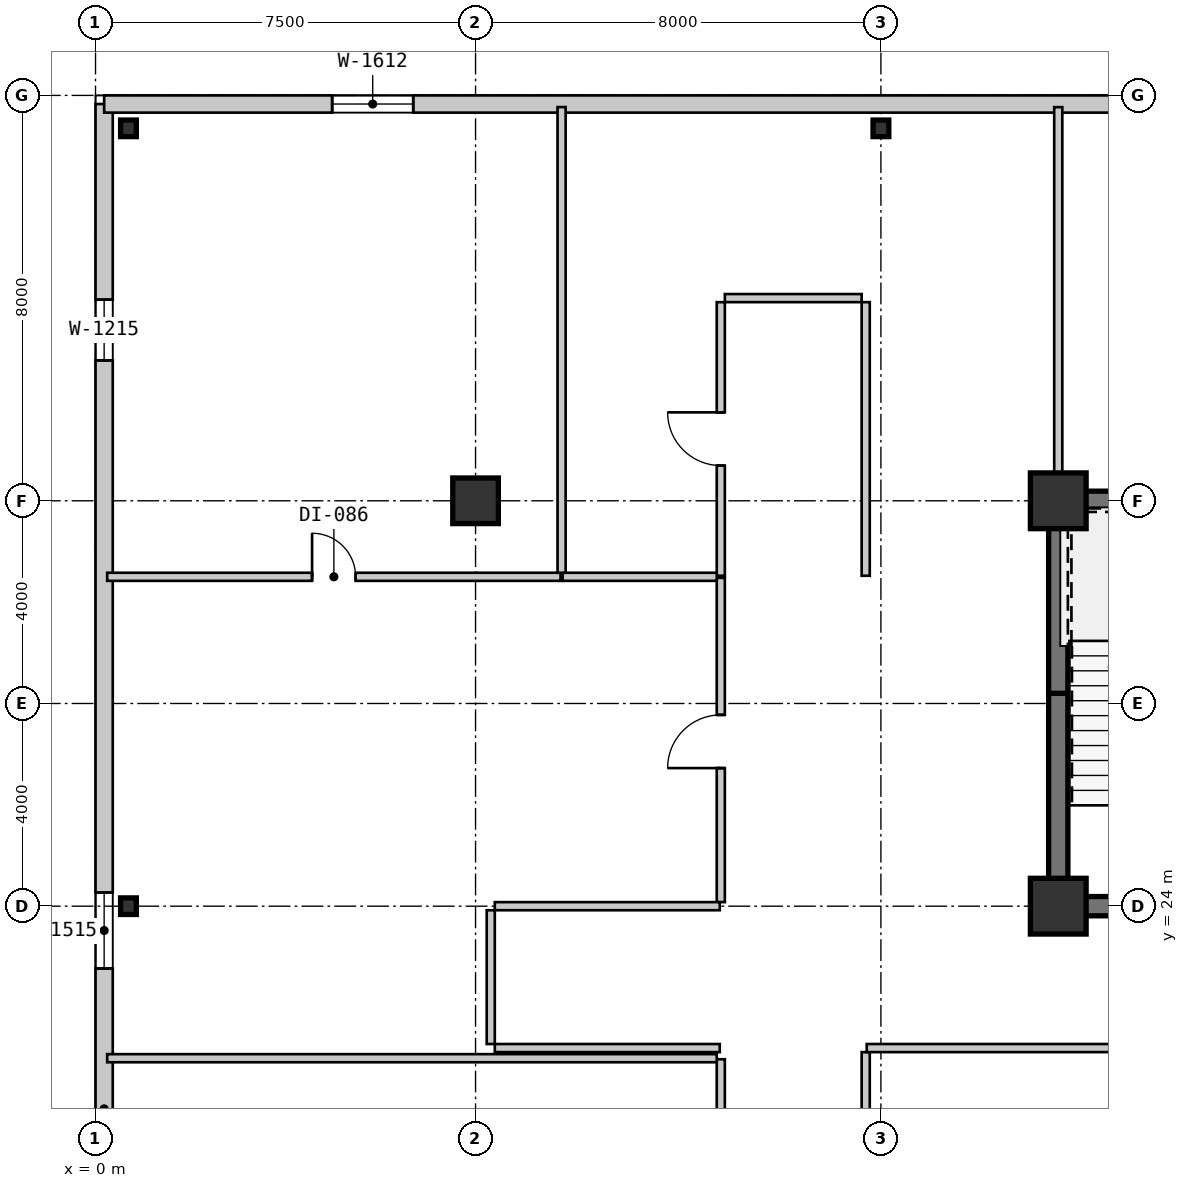
"""IFC4 building model, lengths in metres.
Left out: names, types, materials, properties, quantities, classifications, styles, units other than length and angle.
Written with IfcOpenShell. Run it as: python <this file> out.ifc"""

import sys

from ifc_helpers import new_model, si_unit, direction, frame, frame_2d, origin, origin_2d, place, context, subcontext, project, spatial, rectangle, circle, i_section, extrude, source, transform, mapped, element, fill, save


model = new_model("IFC4")
c1 = context("Model", 3, precision=1e-05, world=origin(), true_north=direction((0.0, 1.0)))
c2 = subcontext(c1, "Body", "Model", "MODEL_VIEW")
j1 = project(units=[si_unit("LENGTHUNIT", "METRE"), si_unit("PLANEANGLEUNIT", "RADIAN")], contexts=[c1])
p1 = place(None, origin())
s1 = spatial("IfcSite", under=j1, at=p1, CompositionType="ELEMENT")
p2 = place(p1, origin())
s2 = spatial("IfcBuilding", under=s1, at=p2, CompositionType="ELEMENT")
p3 = place(p2, frame((0.0, 0.0, 4.55)))
s3 = spatial("IfcBuildingStorey", under=s2, at=p3, CompositionType="ELEMENT", Elevation=4.55)
m1 = source(origin(), c2, "Body", "SweptSolid", [
    extrude(rectangle(XDim=1.1, YDim=1.1, at=origin_2d()), origin(), (0.0, 0.0, 1.0), 3.85),
])
for number, where, z_axis, x_axis in (
    (1, (19.0, 24.0, 0.0), (0.0, 0.0, 1.0), (1.0, 0.0, 0.0)),
    (2, (19.0, 32.0, 0.0), (0.0, 0.0, 1.0), (1.0, 0.0, 0.0)),
):
    element("IfcColumn", number, at=place(p3, frame(where, z_axis=z_axis, x_axis=x_axis)), inside=s3, PredefinedType="COLUMN", context=c2, shape_type="MappedRepresentation", body=[
        mapped(m1, transform((0.0, 0.0, 0.0), scale=1.0)),
    ])
m2 = source(origin(), c2, "Body", "SweptSolid", [
    extrude(circle(Radius=0.45, at=origin_2d()), origin(), (0.0, 0.0, 1.0), 3.85),
])
p4 = place(p3, frame((7.5, 32.0, 0.0), z_axis=(0.0, 0.0, 1.0), x_axis=(1.0, 0.0, 0.0)))
e3 = element("IfcColumn", 3, at=p4, inside=s3, PredefinedType="COLUMN", context=c2, shape_type="MappedRepresentation", body=[
    mapped(m2, transform((0.0, 0.0, 0.0), scale=1.0)),
])
m3 = source(origin(), c2, "Body", "SweptSolid", [
    extrude(i_section(OverallWidth=0.311, OverallDepth=0.327, WebThickness=0.016, FlangeThickness=0.025, at=origin_2d()), origin(), (0.0, 0.0, 1.0), 3.85),
])
for number, where, z_axis, x_axis in (
    (4, (0.65, 24.0, 0.0), (0.0, 0.0, 1.0), (1.0, 0.0, 0.0)),
    (5, (0.65, 39.35, 0.0), (0.0, 0.0, 1.0), (1.0, 0.0, 0.0)),
    (6, (15.5, 39.35, 0.0), (0.0, 0.0, 1.0), (1.0, 0.0, 0.0)),
):
    element("IfcColumn", number, at=place(p3, frame(where, z_axis=z_axis, x_axis=x_axis)), inside=s3, PredefinedType="COLUMN", context=c2, shape_type="MappedRepresentation", body=[
        mapped(m3, transform((0.0, 0.0, 0.0), scale=1.0)),
    ])
m4 = source(origin(), c2, "Body", "SweptSolid", [
    extrude(rectangle(XDim=39.66, YDim=0.34, at=frame_2d((19.83, 0.0))), origin(), (0.0, 0.0, 1.0), 3.59),
])
p5 = place(p3, frame((0.17, 0.17, 0.0), z_axis=(0.0, 0.0, 1.0), x_axis=(0.0, 1.0, 0.0)))
e7 = element("IfcWall", 7, at=p5, inside=s3, PredefinedType="SOLIDWALL", context=c2, shape_type="MappedRepresentation", body=[
    mapped(m4, transform((0.0, 0.0, 0.0), scale=1.0)),
])
m5 = source(origin(), c2, "Body", "SweptSolid", [
    extrude(rectangle(XDim=2.4, YDim=1.8, at=frame_2d((1.2, 0.9))), frame((0.0, 0.18, 0.0), z_axis=(0.0, -1.0, 0.0), x_axis=(1.0, 0.0, 0.0)), (0.0, 0.0, 1.0), 0.36),
])
p6 = place(p5, frame((3.2, 0.0, 0.95)))
e8 = element("IfcOpeningElement", 8, at=p6, cuts=e7, PredefinedType="OPENING", context=c2, shape_type="MappedRepresentation", body=[
    mapped(m5, transform((0.0, 0.0, 0.0), scale=1.0)),
])
m6 = source(origin(), c2, "Body", "SweptSolid", [
    extrude(rectangle(XDim=1.8, YDim=1.6, at=frame_2d((0.9, 0.8))), frame((0.0, 0.18, 0.0), z_axis=(0.0, -1.0, 0.0), x_axis=(1.0, 0.0, 0.0)), (0.0, 0.0, 1.0), 0.36),
])
p7 = place(p5, frame((6.4, 0.0, 0.95)))
e9 = element("IfcOpeningElement", 9, at=p7, cuts=e7, PredefinedType="OPENING", context=c2, shape_type="MappedRepresentation", body=[
    mapped(m6, transform((0.0, 0.0, 0.0), scale=1.0)),
])
m7 = source(origin(), c2, "Body", "SweptSolid", [
    extrude(rectangle(XDim=1.5, YDim=1.5, at=frame_2d((0.75, 0.75))), frame((0.0, 0.18, 0.0), z_axis=(0.0, -1.0, 0.0), x_axis=(1.0, 0.0, 0.0)), (0.0, 0.0, 1.0), 0.36),
])
p8 = place(p5, frame((22.6, 0.0, 0.95)))
e10 = element("IfcOpeningElement", 10, at=p8, cuts=e7, PredefinedType="OPENING", context=c2, shape_type="MappedRepresentation", body=[
    mapped(m7, transform((0.0, 0.0, 0.0), scale=1.0)),
])
m8 = source(origin(), c2, "Body", "SweptSolid", [
    extrude(rectangle(XDim=1.2, YDim=1.5, at=frame_2d((0.6, 0.75))), frame((0.0, 0.18, 0.0), z_axis=(0.0, -1.0, 0.0), x_axis=(1.0, 0.0, 0.0)), (0.0, 0.0, 1.0), 0.36),
])
p9 = place(p5, frame((34.6, 0.0, 0.95)))
e11 = element("IfcOpeningElement", 11, at=p9, cuts=e7, PredefinedType="OPENING", context=c2, shape_type="MappedRepresentation", body=[
    mapped(m8, transform((0.0, 0.0, 0.0), scale=1.0)),
])
m9 = source(origin(), c2, "Body", "SweptSolid", [
    extrude(rectangle(XDim=69.66, YDim=0.34, at=frame_2d((34.83, 0.0))), origin(), (0.0, 0.0, 1.0), 3.59),
])
p10 = place(p3, frame((0.17, 39.83, 0.0), z_axis=(0.0, 0.0, 1.0), x_axis=(1.0, 0.0, 0.0)))
e12 = element("IfcWall", 12, at=p10, inside=s3, PredefinedType="SOLIDWALL", context=c2, shape_type="MappedRepresentation", body=[
    mapped(m9, transform((0.0, 0.0, 0.0), scale=1.0)),
])
m10 = source(origin(), c2, "Body", "SweptSolid", [
    extrude(rectangle(XDim=1.6, YDim=1.2, at=frame_2d((0.8, 0.6))), frame((0.0, 0.18, 0.0), z_axis=(0.0, -1.0, 0.0), x_axis=(1.0, 0.0, 0.0)), (0.0, 0.0, 1.0), 0.36),
])
p11 = place(p10, frame((4.5, 0.0, 0.95)))
e13 = element("IfcOpeningElement", 13, at=p11, cuts=e12, PredefinedType="OPENING", context=c2, shape_type="MappedRepresentation", body=[
    mapped(m10, transform((0.0, 0.0, 0.0), scale=1.0)),
])
p12 = place(p10, frame((22.5, 0.0, 0.95)))
e14 = element("IfcOpeningElement", 14, at=p12, cuts=e12, PredefinedType="OPENING", context=c2, shape_type="MappedRepresentation", body=[
    mapped(m10, transform((0.0, 0.0, 0.0), scale=1.0)),
])
p13 = place(p10, frame((29.0, 0.0, 0.95)))
e15 = element("IfcOpeningElement", 15, at=p13, cuts=e12, PredefinedType="OPENING", context=c2, shape_type="MappedRepresentation", body=[
    mapped(m10, transform((0.0, 0.0, 0.0), scale=1.0)),
])
p14 = place(p10, frame((40.5, 0.0, 0.95)))
e16 = element("IfcOpeningElement", 16, at=p14, cuts=e12, PredefinedType="OPENING", context=c2, shape_type="MappedRepresentation", body=[
    mapped(m10, transform((0.0, 0.0, 0.0), scale=1.0)),
])
p15 = place(p10, frame((46.5, 0.0, 0.95)))
e17 = element("IfcOpeningElement", 17, at=p15, cuts=e12, PredefinedType="OPENING", context=c2, shape_type="MappedRepresentation", body=[
    mapped(m10, transform((0.0, 0.0, 0.0), scale=1.0)),
])
p16 = place(p10, frame((62.5, 0.0, 0.95)))
e18 = element("IfcOpeningElement", 18, at=p16, cuts=e12, PredefinedType="OPENING", context=c2, shape_type="MappedRepresentation", body=[
    mapped(m10, transform((0.0, 0.0, 0.0), scale=1.0)),
])
m11 = source(origin(), c2, "Body", "SweptSolid", [
    extrude(rectangle(XDim=9.19, YDim=0.38, at=frame_2d((4.595, 0.0))), origin(), (0.0, 0.0, 1.0), 3.59),
])
p17 = place(p3, frame((18.81, 32.0, 0.0), z_axis=(0.0, 0.0, 1.0), x_axis=(1.0, 0.0, 0.0)))
e19 = element("IfcWall", 19, at=p17, inside=s3, PredefinedType="SHEAR", context=c2, shape_type="MappedRepresentation", body=[
    mapped(m11, transform((0.0, 0.0, 0.0), scale=1.0)),
])
m12 = source(origin(), c2, "Body", "SweptSolid", [
    extrude(rectangle(XDim=4.01, YDim=0.38, at=frame_2d((2.005, 0.0))), origin(), (0.0, 0.0, 1.0), 3.59),
])
p18 = place(p3, frame((19.0, 24.19, 0.0), z_axis=(0.0, 0.0, 1.0), x_axis=(0.0, 1.0, 0.0)))
e20 = element("IfcWall", 20, at=p18, inside=s3, PredefinedType="SHEAR", context=c2, shape_type="MappedRepresentation", body=[
    mapped(m12, transform((0.0, 0.0, 0.0), scale=1.0)),
])
m13 = source(origin(), c2, "Body", "SweptSolid", [
    extrude(rectangle(XDim=3.61, YDim=0.38, at=frame_2d((1.805, 0.0))), origin(), (0.0, 0.0, 1.0), 3.59),
])
p19 = place(p3, frame((19.0, 28.2, 0.0), z_axis=(0.0, 0.0, 1.0), x_axis=(0.0, 1.0, 0.0)))
e21 = element("IfcWall", 21, at=p19, inside=s3, PredefinedType="SHEAR", context=c2, shape_type="MappedRepresentation", body=[
    mapped(m13, transform((0.0, 0.0, 0.0), scale=1.0)),
])
m14 = source(origin(), c2, "Body", "SweptSolid", [
    extrude(rectangle(XDim=4.98, YDim=0.38, at=frame_2d((2.49, 0.0))), origin(), (0.0, 0.0, 1.0), 3.59),
])
p20 = place(p3, frame((18.81, 24.0, 0.0), z_axis=(0.0, 0.0, 1.0), x_axis=(1.0, 0.0, 0.0)))
e22 = element("IfcWall", 22, at=p20, inside=s3, PredefinedType="SHEAR", context=c2, shape_type="MappedRepresentation", body=[
    mapped(m14, transform((0.0, 0.0, 0.0), scale=1.0)),
])
m15 = source(origin(), c2, "Body", "SweptSolid", [
    extrude(rectangle(XDim=13.44, YDim=0.16, at=frame_2d((6.72, 0.0))), origin(), (0.0, 0.0, 1.0), 3.59),
])
p21 = place(p3, frame((15.2, 21.12, 0.0), z_axis=(0.0, 0.0, 1.0), x_axis=(0.0, -1.0, 0.0)))
e23 = element("IfcWall", 23, at=p21, inside=s3, PredefinedType="PARTITIONING", context=c2, shape_type="MappedRepresentation", body=[
    mapped(m15, transform((0.0, 0.0, 0.0), scale=1.0)),
])
m16 = source(origin(), c2, "Body", "SweptSolid", [
    extrude(rectangle(XDim=1.05, YDim=2.1, at=frame_2d((0.525, 1.05))), frame((0.0, 0.09, 0.0), z_axis=(0.0, -1.0, 0.0), x_axis=(1.0, 0.0, 0.0)), (0.0, 0.0, 1.0), 0.18),
])
p22 = place(p21, frame((6.165, 0.0, 0.0)))
e24 = element("IfcOpeningElement", 24, at=p22, cuts=e23, PredefinedType="OPENING", context=c2, shape_type="MappedRepresentation", body=[
    mapped(m16, transform((0.0, 0.0, 0.0), scale=1.0)),
])
m17 = source(origin(), c2, "Body", "SweptSolid", [
    extrude(rectangle(XDim=12.76, YDim=0.16, at=frame_2d((6.38, 0.0))), origin(), (0.0, 0.0, 1.0), 3.59),
])
p23 = place(p3, frame((27.98, 21.2, 0.0), z_axis=(0.0, 0.0, 1.0), x_axis=(-1.0, 0.0, 0.0)))
e25 = element("IfcWall", 25, at=p23, inside=s3, PredefinedType="PARTITIONING", context=c2, shape_type="MappedRepresentation", body=[
    mapped(m17, transform((0.0, 0.0, 0.0), scale=1.0)),
])
m18 = source(origin(), c2, "Body", "SweptSolid", [
    extrude(rectangle(XDim=4.59, YDim=0.16, at=frame_2d((2.295, 0.0))), origin(), (0.0, 0.0, 1.0), 3.59),
])
p24 = place(p3, frame((12.34, 16.39, 0.0), z_axis=(0.0, 0.0, 1.0), x_axis=(0.0, 1.0, 0.0)))
e26 = element("IfcWall", 26, at=p24, inside=s3, PredefinedType="PARTITIONING", context=c2, shape_type="MappedRepresentation", body=[
    mapped(m18, transform((0.0, 0.0, 0.0), scale=1.0)),
])
p25 = place(p24, frame((1.685, 0.0, 0.0)))
e27 = element("IfcOpeningElement", 27, at=p25, cuts=e26, PredefinedType="OPENING", context=c2, shape_type="MappedRepresentation", body=[
    mapped(m16, transform((0.0, 0.0, 0.0), scale=1.0)),
])
m19 = source(origin(), c2, "Body", "SweptSolid", [
    extrude(rectangle(XDim=6.4, YDim=0.16, at=frame_2d((3.2, 0.0))), origin(), (0.0, 0.0, 1.0), 3.59),
])
p26 = place(p3, frame((12.34, 24.08, 0.0), z_axis=(0.0, 0.0, 1.0), x_axis=(0.0, 1.0, 0.0)))
e28 = element("IfcWall", 28, at=p26, inside=s3, PredefinedType="PARTITIONING", context=c2, shape_type="MappedRepresentation", body=[
    mapped(m19, transform((0.0, 0.0, 0.0), scale=1.0)),
])
p27 = place(p26, frame((2.645, 0.0, 0.0)))
e29 = element("IfcOpeningElement", 29, at=p27, cuts=e28, PredefinedType="OPENING", context=c2, shape_type="MappedRepresentation", body=[
    mapped(m16, transform((0.0, 0.0, 0.0), scale=1.0)),
])
m20 = source(origin(), c2, "Body", "SweptSolid", [
    extrude(rectangle(XDim=4.44, YDim=0.16, at=frame_2d((2.22, 0.0))), origin(), (0.0, 0.0, 1.0), 3.59),
])
for number, where, z_axis, x_axis in (
    (30, (12.32, 21.2, 0.0), (0.0, 0.0, 1.0), (-1.0, 0.0, 0.0)),
    (31, (7.88, 24.0, 0.0), (0.0, 0.0, 1.0), (1.0, 0.0, 0.0)),
):
    element("IfcWall", number, at=place(p3, frame(where, z_axis=z_axis, x_axis=x_axis)), inside=s3, PredefinedType="PARTITIONING", context=c2, shape_type="MappedRepresentation", body=[
        mapped(m20, transform((0.0, 0.0, 0.0), scale=1.0)),
    ])
m21 = source(origin(), c2, "Body", "SweptSolid", [
    extrude(rectangle(XDim=2.64, YDim=0.16, at=frame_2d((1.32, 0.0))), origin(), (0.0, 0.0, 1.0), 3.59),
])
p28 = place(p3, frame((7.8, 21.28, 0.0), z_axis=(0.0, 0.0, 1.0), x_axis=(0.0, 1.0, 0.0)))
e32 = element("IfcWall", 32, at=p28, inside=s3, PredefinedType="PARTITIONING", context=c2, shape_type="MappedRepresentation", body=[
    mapped(m21, transform((0.0, 0.0, 0.0), scale=1.0)),
])
m22 = source(origin(), c2, "Body", "SweptSolid", [
    extrude(rectangle(XDim=5.4, YDim=0.16, at=frame_2d((2.7, 0.0))), origin(), (0.0, 0.0, 1.0), 3.59),
])
p29 = place(p3, frame((12.34, 30.52, 0.0), z_axis=(0.0, 0.0, 1.0), x_axis=(0.0, 1.0, 0.0)))
e33 = element("IfcWall", 33, at=p29, inside=s3, PredefinedType="PARTITIONING", context=c2, shape_type="MappedRepresentation", body=[
    mapped(m22, transform((0.0, 0.0, 0.0), scale=1.0)),
])
p30 = place(p29, frame((2.175, 0.0, 0.0)))
e34 = element("IfcOpeningElement", 34, at=p30, cuts=e33, PredefinedType="OPENING", context=c2, shape_type="MappedRepresentation", body=[
    mapped(m16, transform((0.0, 0.0, 0.0), scale=1.0)),
])
p31 = place(p3, frame((15.2, 35.92, 0.0), z_axis=(0.0, 0.0, 1.0), x_axis=(0.0, -1.0, 0.0)))
e35 = element("IfcWall", 35, at=p31, inside=s3, PredefinedType="PARTITIONING", context=c2, shape_type="MappedRepresentation", body=[
    mapped(m22, transform((0.0, 0.0, 0.0), scale=1.0)),
])
m23 = source(origin(), c2, "Body", "SweptSolid", [
    extrude(rectangle(XDim=2.7, YDim=0.16, at=frame_2d((1.35, 0.0))), origin(), (0.0, 0.0, 1.0), 3.59),
])
p32 = place(p3, frame((12.42, 36.0, 0.0), z_axis=(0.0, 0.0, 1.0), x_axis=(1.0, 0.0, 0.0)))
e36 = element("IfcWall", 36, at=p32, inside=s3, PredefinedType="PARTITIONING", context=c2, shape_type="MappedRepresentation", body=[
    mapped(m23, transform((0.0, 0.0, 0.0), scale=1.0)),
])
m24 = source(origin(), c2, "Body", "SweptSolid", [
    extrude(rectangle(XDim=12.03, YDim=0.16, at=frame_2d((6.015, 0.0))), origin(), (0.0, 0.0, 1.0), 3.59),
])
p33 = place(p3, frame((0.23, 21.0, 0.0), z_axis=(0.0, 0.0, 1.0), x_axis=(1.0, 0.0, 0.0)))
e37 = element("IfcWall", 37, at=p33, inside=s3, PredefinedType="PARTITIONING", context=c2, shape_type="MappedRepresentation", body=[
    mapped(m24, transform((0.0, 0.0, 0.0), scale=1.0)),
])
m25 = source(origin(), c2, "Body", "SweptSolid", [
    extrude(rectangle(XDim=8.948, YDim=0.16, at=frame_2d((4.474, 0.0))), origin(), (0.0, 0.0, 1.0), 3.59),
])
p34 = place(p3, frame((0.23, 30.5, 0.0), z_axis=(0.0, 0.0, 1.0), x_axis=(1.0, 0.0, 0.0)))
e38 = element("IfcWall", 38, at=p34, inside=s3, PredefinedType="PARTITIONING", context=c2, shape_type="MappedRepresentation", body=[
    mapped(m25, transform((0.0, 0.0, 0.0), scale=1.0)),
])
m26 = source(origin(), c2, "Body", "SweptSolid", [
    extrude(rectangle(XDim=0.86, YDim=2.1, at=frame_2d((0.43, 1.05))), frame((0.0, 0.09, 0.0), z_axis=(0.0, -1.0, 0.0), x_axis=(1.0, 0.0, 0.0)), (0.0, 0.0, 1.0), 0.18),
])
p35 = place(p34, frame((4.044, 0.0, 0.0)))
e39 = element("IfcOpeningElement", 39, at=p35, cuts=e38, PredefinedType="OPENING", context=c2, shape_type="MappedRepresentation", body=[
    mapped(m26, transform((0.0, 0.0, 0.0), scale=1.0)),
])
m27 = source(origin(), c2, "Body", "SweptSolid", [
    extrude(rectangle(XDim=3.042, YDim=0.16, at=frame_2d((1.521, 0.0))), origin(), (0.0, 0.0, 1.0), 3.59),
])
p36 = place(p3, frame((9.218, 30.5, 0.0), z_axis=(0.0, 0.0, 1.0), x_axis=(1.0, 0.0, 0.0)))
e40 = element("IfcWall", 40, at=p36, inside=s3, PredefinedType="PARTITIONING", context=c2, shape_type="MappedRepresentation", body=[
    mapped(m27, transform((0.0, 0.0, 0.0), scale=1.0)),
])
m28 = source(origin(), c2, "Body", "SweptSolid", [
    extrude(rectangle(XDim=9.19, YDim=0.16, at=frame_2d((4.595, 0.0))), origin(), (0.0, 0.0, 1.0), 3.59),
])
p37 = place(p3, frame((9.198, 39.77, 0.0), z_axis=(0.0, 0.0, 1.0), x_axis=(0.0, -1.0, 0.0)))
e41 = element("IfcWall", 41, at=p37, inside=s3, PredefinedType="PARTITIONING", context=c2, shape_type="MappedRepresentation", body=[
    mapped(m28, transform((0.0, 0.0, 0.0), scale=1.0)),
])
m29 = source(origin(), c2, "Body", "SweptSolid", [
    extrude(rectangle(XDim=7.578, YDim=0.16, at=frame_2d((3.789, 0.0))), origin(), (0.0, 0.0, 1.0), 3.59),
])
p38 = place(p3, frame((19.0, 39.768, 0.0), z_axis=(0.0, 0.0, 1.0), x_axis=(0.0, -1.0, 0.0)))
e42 = element("IfcWall", 42, at=p38, inside=s3, PredefinedType="PARTITIONING", context=c2, shape_type="MappedRepresentation", body=[
    mapped(m29, transform((0.0, 0.0, 0.0), scale=1.0)),
])
m30 = source(origin(), c2, "Body", "SweptSolid", [
    extrude(rectangle(XDim=1.5, YDim=1.5, at=frame_2d((0.75, 0.75))), frame((0.0, 0.03, 0.0), z_axis=(0.0, -1.0, 0.0), x_axis=(1.0, 0.0, 0.0)), (0.0, 0.0, 1.0), 0.06),
])
p39 = place(p8, origin())
e43 = element("IfcWindow", 43, at=p39, inside=s3, PartitioningType="SINGLE_PANEL", PredefinedType="WINDOW", context=c2, shape_type="MappedRepresentation", body=[
    mapped(m30, transform((0.0, 0.0, 0.0), scale=1.0)),
])
fill(e10, e43)
m31 = source(origin(), c2, "Body", "SweptSolid", [
    extrude(rectangle(XDim=1.2, YDim=1.5, at=frame_2d((0.6, 0.75))), frame((0.0, 0.03, 0.0), z_axis=(0.0, -1.0, 0.0), x_axis=(1.0, 0.0, 0.0)), (0.0, 0.0, 1.0), 0.06),
])
p40 = place(p9, origin())
e44 = element("IfcWindow", 44, at=p40, inside=s3, PartitioningType="SINGLE_PANEL", PredefinedType="WINDOW", context=c2, shape_type="MappedRepresentation", body=[
    mapped(m31, transform((0.0, 0.0, 0.0), scale=1.0)),
])
fill(e11, e44)
m32 = source(origin(), c2, "Body", "SweptSolid", [
    extrude(rectangle(XDim=1.6, YDim=1.2, at=frame_2d((0.8, 0.6))), frame((0.0, 0.03, 0.0), z_axis=(0.0, -1.0, 0.0), x_axis=(1.0, 0.0, 0.0)), (0.0, 0.0, 1.0), 0.06),
])
p41 = place(p11, origin())
e45 = element("IfcWindow", 45, at=p41, inside=s3, PartitioningType="SINGLE_PANEL", PredefinedType="WINDOW", context=c2, shape_type="MappedRepresentation", body=[
    mapped(m32, transform((0.0, 0.0, 0.0), scale=1.0)),
])
fill(e13, e45)
m33 = source(origin(), c2, "Body", "SweptSolid", [
    extrude(rectangle(XDim=1.05, YDim=2.1, at=frame_2d((0.525, 1.05))), frame((0.0, 0.025, 0.0), z_axis=(0.0, -1.0, 0.0), x_axis=(1.0, 0.0, 0.0)), (0.0, 0.0, 1.0), 0.05),
])
p42 = place(p27, origin())
e46 = element("IfcDoor", 46, at=p42, inside=s3, OperationType="SINGLE_SWING_LEFT", PredefinedType="DOOR", context=c2, shape_type="MappedRepresentation", body=[
    mapped(m33, transform((0.0, 0.0, 0.0), scale=1.0)),
])
fill(e29, e46)
p43 = place(p30, origin())
e47 = element("IfcDoor", 47, at=p43, inside=s3, OperationType="SINGLE_SWING_RIGHT", PredefinedType="DOOR", context=c2, shape_type="MappedRepresentation", body=[
    mapped(m33, transform((0.0, 0.0, 0.0), scale=1.0)),
])
fill(e34, e47)
m34 = source(origin(), c2, "Body", "SweptSolid", [
    extrude(rectangle(XDim=0.86, YDim=2.1, at=frame_2d((0.43, 1.05))), frame((0.0, 0.025, 0.0), z_axis=(0.0, -1.0, 0.0), x_axis=(1.0, 0.0, 0.0)), (0.0, 0.0, 1.0), 0.05),
])
p44 = place(p35, origin())
e48 = element("IfcDoor", 48, at=p44, inside=s3, OperationType="SINGLE_SWING_LEFT", PredefinedType="DOOR", context=c2, shape_type="MappedRepresentation", body=[
    mapped(m34, transform((0.0, 0.0, 0.0), scale=1.0)),
])
fill(e39, e48)
save(model, sys.argv[1])
